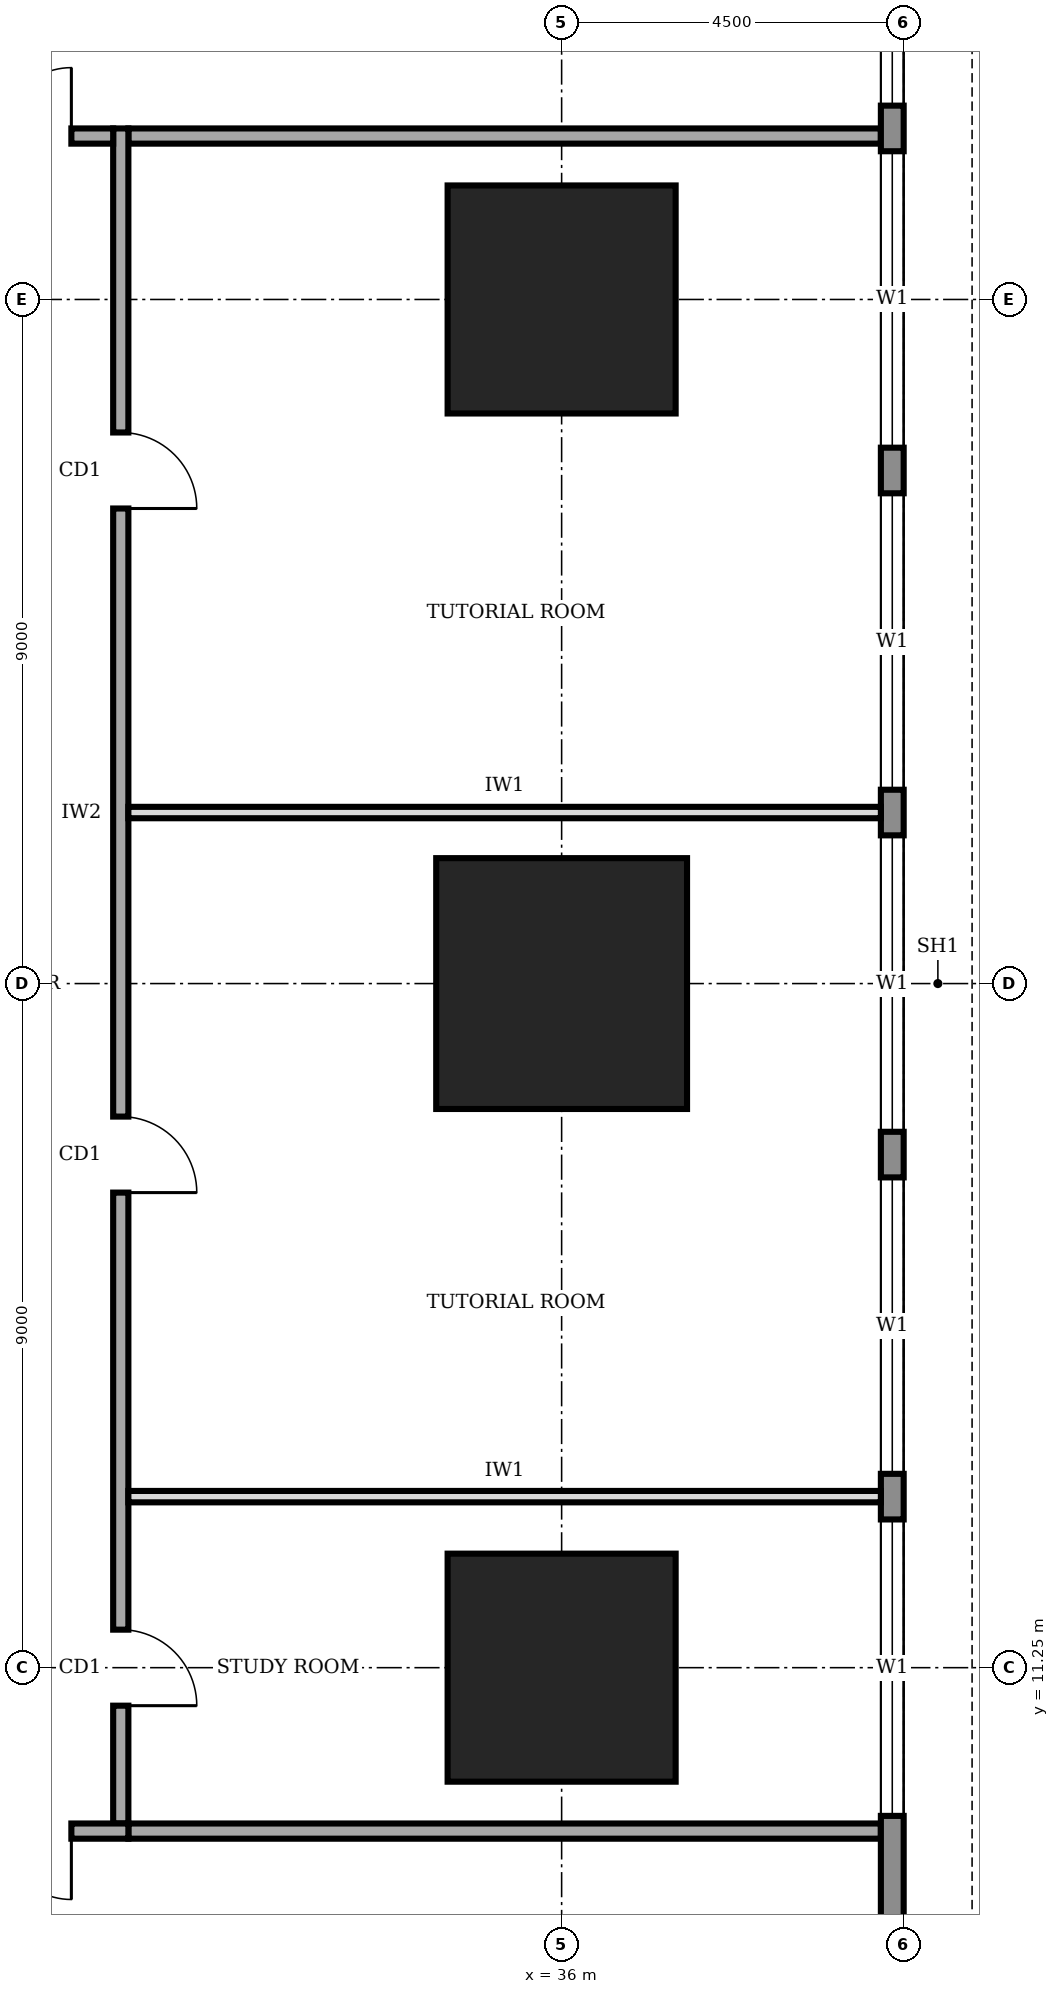
"""IFC4 building model, lengths in metres.
Left out: names, types, materials, properties, quantities, classifications, styles, units other than length and angle.
Written with IfcOpenShell. Run it as: python <this file> out.ifc"""

import sys

from ifc_helpers import new_model, si_unit, direction, frame, frame_2d, origin, origin_2d, place, context, subcontext, project, spatial, rectangle, extrude, element, fill, save


model = new_model("IFC4")
c1 = context("Model", 3, precision=1e-05, world=origin(), true_north=direction((0.0, 1.0)))
c2 = subcontext(c1, "Body", "Model", "MODEL_VIEW")
j1 = project(units=[si_unit("LENGTHUNIT", "METRE"), si_unit("PLANEANGLEUNIT", "RADIAN")], contexts=[c1])
p1 = place(None, origin())
s1 = spatial("IfcSite", under=j1, at=p1, CompositionType="ELEMENT")
p2 = place(p1, origin())
s2 = spatial("IfcBuilding", under=s1, at=p2, CompositionType="ELEMENT")
p3 = place(p2, frame((0.0, 0.0, 37.0)))
s3 = spatial("IfcBuildingStorey", under=s2, at=p3, CompositionType="ELEMENT", Elevation=37.0)
p4 = place(p3, frame((36.0, 11.25, 0.0), z_axis=(0.0, 0.0, 1.0), x_axis=(1.0, 0.0, 0.0)))
e1 = element("IfcColumn", 1, at=p4, inside=s3, PredefinedType="COLUMN", context=c2, shape_type="SweptSolid", body=[
    extrude(rectangle(XDim=3.0, YDim=3.0, at=origin_2d()), origin(), (0.0, 0.0, 1.0), 4.0),
])
p5 = place(p3, frame((36.0, 20.25, 0.0), z_axis=(0.0, 0.0, 1.0), x_axis=(1.0, 0.0, 0.0)))
e2 = element("IfcColumn", 2, at=p5, inside=s3, PredefinedType="COLUMN", context=c2, shape_type="SweptSolid", body=[
    extrude(rectangle(XDim=3.3, YDim=3.3, at=origin_2d()), origin(), (0.0, 0.0, 1.0), 4.0),
])
p6 = place(p3, frame((36.0, 29.25, 0.0), z_axis=(0.0, 0.0, 1.0), x_axis=(1.0, 0.0, 0.0)))
e3 = element("IfcColumn", 3, at=p6, inside=s3, PredefinedType="COLUMN", context=c2, shape_type="SweptSolid", body=[
    extrude(rectangle(XDim=3.0, YDim=3.0, at=origin_2d()), origin(), (0.0, 0.0, 1.0), 4.0),
])
p7 = place(p3, frame((40.35, 4.52, 0.0), z_axis=(0.0, 0.0, 1.0), x_axis=(0.0, 1.0, 0.0)))
e4 = element("IfcWall", 4, at=p7, inside=s3, PredefinedType="STANDARD", context=c2, shape_type="SweptSolid", body=[
    extrude(rectangle(XDim=31.46, YDim=0.3, at=frame_2d((15.73, 0.0))), origin(), (0.0, 0.0, 1.0), 3.75),
])
p8 = place(p7, frame((4.78, 0.0, 0.9)))
e5 = element("IfcOpeningElement", 5, at=p8, cuts=e4, PredefinedType="OPENING", context=c2, shape_type="SweptSolid", body=[
    extrude(rectangle(XDim=3.9, YDim=2.2, at=frame_2d((1.95, 1.1))), frame((0.0, 0.16, 0.0), z_axis=(0.0, -1.0, 0.0), x_axis=(1.0, 0.0, 0.0)), (0.0, 0.0, 1.0), 0.32),
])
p9 = place(p7, frame((9.28, 0.0, 0.9)))
e6 = element("IfcOpeningElement", 6, at=p9, cuts=e4, PredefinedType="OPENING", context=c2, shape_type="SweptSolid", body=[
    extrude(rectangle(XDim=3.9, YDim=2.2, at=frame_2d((1.95, 1.1))), frame((0.0, 0.16, 0.0), z_axis=(0.0, -1.0, 0.0), x_axis=(1.0, 0.0, 0.0)), (0.0, 0.0, 1.0), 0.32),
])
p10 = place(p7, frame((13.78, 0.0, 0.9)))
e7 = element("IfcOpeningElement", 7, at=p10, cuts=e4, PredefinedType="OPENING", context=c2, shape_type="SweptSolid", body=[
    extrude(rectangle(XDim=3.9, YDim=2.2, at=frame_2d((1.95, 1.1))), frame((0.0, 0.16, 0.0), z_axis=(0.0, -1.0, 0.0), x_axis=(1.0, 0.0, 0.0)), (0.0, 0.0, 1.0), 0.32),
])
p11 = place(p7, frame((18.28, 0.0, 0.9)))
e8 = element("IfcOpeningElement", 8, at=p11, cuts=e4, PredefinedType="OPENING", context=c2, shape_type="SweptSolid", body=[
    extrude(rectangle(XDim=3.9, YDim=2.2, at=frame_2d((1.95, 1.1))), frame((0.0, 0.16, 0.0), z_axis=(0.0, -1.0, 0.0), x_axis=(1.0, 0.0, 0.0)), (0.0, 0.0, 1.0), 0.32),
])
p12 = place(p7, frame((22.78, 0.0, 0.9)))
e9 = element("IfcOpeningElement", 9, at=p12, cuts=e4, PredefinedType="OPENING", context=c2, shape_type="SweptSolid", body=[
    extrude(rectangle(XDim=3.9, YDim=2.2, at=frame_2d((1.95, 1.1))), frame((0.0, 0.16, 0.0), z_axis=(0.0, -1.0, 0.0), x_axis=(1.0, 0.0, 0.0)), (0.0, 0.0, 1.0), 0.32),
])
p13 = place(p7, frame((27.28, 0.0, 0.9)))
e10 = element("IfcOpeningElement", 10, at=p13, cuts=e4, PredefinedType="OPENING", context=c2, shape_type="SweptSolid", body=[
    extrude(rectangle(XDim=3.9, YDim=2.2, at=frame_2d((1.95, 1.1))), frame((0.0, 0.16, 0.0), z_axis=(0.0, -1.0, 0.0), x_axis=(1.0, 0.0, 0.0)), (0.0, 0.0, 1.0), 0.32),
])
p14 = place(p3, frame((11.9, 9.1, 0.0), z_axis=(0.0, 0.0, 1.0), x_axis=(1.0, 0.0, 0.0)))
e11 = element("IfcWall", 11, at=p14, inside=s3, PredefinedType="SOLIDWALL", context=c2, shape_type="SweptSolid", body=[
    extrude(rectangle(XDim=18.4, YDim=0.2, at=frame_2d((9.2, 0.0))), origin(), (0.0, 0.0, 1.0), 3.75),
])
p15 = place(p14, frame((0.275, 0.0, 0.0)))
e12 = element("IfcOpeningElement", 12, at=p15, cuts=e11, PredefinedType="OPENING", context=c2, shape_type="SweptSolid", body=[
    extrude(rectangle(XDim=1.0, YDim=2.1, at=frame_2d((0.5, 1.05))), frame((0.0, 0.11, 0.0), z_axis=(0.0, -1.0, 0.0), x_axis=(1.0, 0.0, 0.0)), (0.0, 0.0, 1.0), 0.22),
])
p16 = place(p14, frame((3.35, 0.0, 0.0)))
e13 = element("IfcOpeningElement", 13, at=p16, cuts=e11, PredefinedType="OPENING", context=c2, shape_type="SweptSolid", body=[
    extrude(rectangle(XDim=1.0, YDim=2.1, at=frame_2d((0.5, 1.05))), frame((0.0, 0.11, 0.0), z_axis=(0.0, -1.0, 0.0), x_axis=(1.0, 0.0, 0.0)), (0.0, 0.0, 1.0), 0.22),
])
p17 = place(p14, frame((10.1, 0.0, 0.0)))
e14 = element("IfcOpeningElement", 14, at=p17, cuts=e11, PredefinedType="OPENING", context=c2, shape_type="SweptSolid", body=[
    extrude(rectangle(XDim=1.0, YDim=2.1, at=frame_2d((0.5, 1.05))), frame((0.0, 0.11, 0.0), z_axis=(0.0, -1.0, 0.0), x_axis=(1.0, 0.0, 0.0)), (0.0, 0.0, 1.0), 0.22),
])
p18 = place(p14, frame((15.85, 0.0, 0.0)))
e15 = element("IfcOpeningElement", 15, at=p18, cuts=e11, PredefinedType="OPENING", context=c2, shape_type="SweptSolid", body=[
    extrude(rectangle(XDim=1.8, YDim=2.1, at=frame_2d((0.9, 1.05))), frame((0.0, 0.11, 0.0), z_axis=(0.0, -1.0, 0.0), x_axis=(1.0, 0.0, 0.0)), (0.0, 0.0, 1.0), 0.22),
])
p19 = place(p3, frame((30.2, 9.2, 0.0), z_axis=(0.0, 0.0, 1.0), x_axis=(0.0, 1.0, 0.0)))
e16 = element("IfcWall", 16, at=p19, inside=s3, PredefinedType="SOLIDWALL", context=c2, shape_type="SweptSolid", body=[
    extrude(rectangle(XDim=22.3, YDim=0.2, at=frame_2d((11.15, 0.0))), origin(), (0.0, 0.0, 1.0), 3.75),
])
p20 = place(p19, frame((1.55, 0.0, 0.0)))
e17 = element("IfcOpeningElement", 17, at=p20, cuts=e16, PredefinedType="OPENING", context=c2, shape_type="SweptSolid", body=[
    extrude(rectangle(XDim=1.0, YDim=2.1, at=frame_2d((0.5, 1.05))), frame((0.0, 0.11, 0.0), z_axis=(0.0, -1.0, 0.0), x_axis=(1.0, 0.0, 0.0)), (0.0, 0.0, 1.0), 0.22),
])
p21 = place(p19, frame((8.3, 0.0, 0.0)))
e18 = element("IfcOpeningElement", 18, at=p21, cuts=e16, PredefinedType="OPENING", context=c2, shape_type="SweptSolid", body=[
    extrude(rectangle(XDim=1.0, YDim=2.1, at=frame_2d((0.5, 1.05))), frame((0.0, 0.11, 0.0), z_axis=(0.0, -1.0, 0.0), x_axis=(1.0, 0.0, 0.0)), (0.0, 0.0, 1.0), 0.22),
])
p22 = place(p19, frame((17.3, 0.0, 0.0)))
e19 = element("IfcOpeningElement", 19, at=p22, cuts=e16, PredefinedType="OPENING", context=c2, shape_type="SweptSolid", body=[
    extrude(rectangle(XDim=1.0, YDim=2.1, at=frame_2d((0.5, 1.05))), frame((0.0, 0.11, 0.0), z_axis=(0.0, -1.0, 0.0), x_axis=(1.0, 0.0, 0.0)), (0.0, 0.0, 1.0), 0.22),
])
p23 = place(p3, frame((30.1, 31.4, 0.0), z_axis=(0.0, 0.0, 1.0), x_axis=(-1.0, 0.0, 0.0)))
e20 = element("IfcWall", 20, at=p23, inside=s3, PredefinedType="SOLIDWALL", context=c2, shape_type="SweptSolid", body=[
    extrude(rectangle(XDim=18.4, YDim=0.2, at=frame_2d((9.2, 0.0))), origin(), (0.0, 0.0, 1.0), 3.75),
])
p24 = place(p23, frame((16.925, 0.0, 0.0)))
e21 = element("IfcOpeningElement", 21, at=p24, cuts=e20, PredefinedType="OPENING", context=c2, shape_type="SweptSolid", body=[
    extrude(rectangle(XDim=1.0, YDim=2.1, at=frame_2d((0.5, 1.05))), frame((0.0, 0.11, 0.0), z_axis=(0.0, -1.0, 0.0), x_axis=(1.0, 0.0, 0.0)), (0.0, 0.0, 1.0), 0.22),
])
p25 = place(p23, frame((13.85, 0.0, 0.0)))
e22 = element("IfcOpeningElement", 22, at=p25, cuts=e20, PredefinedType="OPENING", context=c2, shape_type="SweptSolid", body=[
    extrude(rectangle(XDim=1.0, YDim=2.1, at=frame_2d((0.5, 1.05))), frame((0.0, 0.11, 0.0), z_axis=(0.0, -1.0, 0.0), x_axis=(1.0, 0.0, 0.0)), (0.0, 0.0, 1.0), 0.22),
])
p26 = place(p23, frame((7.1, 0.0, 0.0)))
e23 = element("IfcOpeningElement", 23, at=p26, cuts=e20, PredefinedType="OPENING", context=c2, shape_type="SweptSolid", body=[
    extrude(rectangle(XDim=1.0, YDim=2.1, at=frame_2d((0.5, 1.05))), frame((0.0, 0.11, 0.0), z_axis=(0.0, -1.0, 0.0), x_axis=(1.0, 0.0, 0.0)), (0.0, 0.0, 1.0), 0.22),
])
p27 = place(p23, frame((0.55, 0.0, 0.0)))
e24 = element("IfcOpeningElement", 24, at=p27, cuts=e20, PredefinedType="OPENING", context=c2, shape_type="SweptSolid", body=[
    extrude(rectangle(XDim=1.8, YDim=2.1, at=frame_2d((0.9, 1.05))), frame((0.0, 0.11, 0.0), z_axis=(0.0, -1.0, 0.0), x_axis=(1.0, 0.0, 0.0)), (0.0, 0.0, 1.0), 0.22),
])
for number, where, z_axis, x_axis in (
    (25, (30.3, 9.1, 0.0), (0.0, 0.0, 1.0), (1.0, 0.0, 0.0)),
    (26, (30.3, 31.4, 0.0), (0.0, 0.0, 1.0), (1.0, 0.0, 0.0)),
):
    element("IfcWall", number, at=place(p3, frame(where, z_axis=z_axis, x_axis=x_axis)), inside=s3, PredefinedType="SOLIDWALL", context=c2, shape_type="SweptSolid", body=[
        extrude(rectangle(XDim=9.9, YDim=0.2, at=frame_2d((4.95, 0.0))), origin(), (0.0, 0.0, 1.0), 3.75),
    ])
for number, where, z_axis, x_axis in (
    (27, (30.3, 13.5, 0.0), (0.0, 0.0, 1.0), (1.0, 0.0, 0.0)),
    (28, (30.3, 22.5, 0.0), (0.0, 0.0, 1.0), (1.0, 0.0, 0.0)),
):
    element("IfcWall", number, at=place(p3, frame(where, z_axis=z_axis, x_axis=x_axis)), inside=s3, PredefinedType="PARTITIONING", context=c2, shape_type="SweptSolid", body=[
        extrude(rectangle(XDim=9.9, YDim=0.15, at=frame_2d((4.95, 0.0))), origin(), (0.0, 0.0, 1.0), 3.75),
    ])
p28 = place(p8, origin())
e29 = element("IfcWindow", 29, at=p28, inside=s3, PartitioningType="SINGLE_PANEL", PredefinedType="WINDOW", context=c2, shape_type="SweptSolid", body=[
    extrude(rectangle(XDim=3.9, YDim=2.2, at=frame_2d((1.95, 1.1))), frame((0.0, 0.03, 0.0), z_axis=(0.0, -1.0, 0.0), x_axis=(1.0, 0.0, 0.0)), (0.0, 0.0, 1.0), 0.06),
])
fill(e5, e29)
p29 = place(p9, origin())
e30 = element("IfcWindow", 30, at=p29, inside=s3, PartitioningType="SINGLE_PANEL", PredefinedType="WINDOW", context=c2, shape_type="SweptSolid", body=[
    extrude(rectangle(XDim=3.9, YDim=2.2, at=frame_2d((1.95, 1.1))), frame((0.0, 0.03, 0.0), z_axis=(0.0, -1.0, 0.0), x_axis=(1.0, 0.0, 0.0)), (0.0, 0.0, 1.0), 0.06),
])
fill(e6, e30)
p30 = place(p10, origin())
e31 = element("IfcWindow", 31, at=p30, inside=s3, PartitioningType="SINGLE_PANEL", PredefinedType="WINDOW", context=c2, shape_type="SweptSolid", body=[
    extrude(rectangle(XDim=3.9, YDim=2.2, at=frame_2d((1.95, 1.1))), frame((0.0, 0.03, 0.0), z_axis=(0.0, -1.0, 0.0), x_axis=(1.0, 0.0, 0.0)), (0.0, 0.0, 1.0), 0.06),
])
fill(e7, e31)
p31 = place(p11, origin())
e32 = element("IfcWindow", 32, at=p31, inside=s3, PartitioningType="SINGLE_PANEL", PredefinedType="WINDOW", context=c2, shape_type="SweptSolid", body=[
    extrude(rectangle(XDim=3.9, YDim=2.2, at=frame_2d((1.95, 1.1))), frame((0.0, 0.03, 0.0), z_axis=(0.0, -1.0, 0.0), x_axis=(1.0, 0.0, 0.0)), (0.0, 0.0, 1.0), 0.06),
])
fill(e8, e32)
p32 = place(p12, origin())
e33 = element("IfcWindow", 33, at=p32, inside=s3, PartitioningType="SINGLE_PANEL", PredefinedType="WINDOW", context=c2, shape_type="SweptSolid", body=[
    extrude(rectangle(XDim=3.9, YDim=2.2, at=frame_2d((1.95, 1.1))), frame((0.0, 0.03, 0.0), z_axis=(0.0, -1.0, 0.0), x_axis=(1.0, 0.0, 0.0)), (0.0, 0.0, 1.0), 0.06),
])
fill(e9, e33)
p33 = place(p13, origin())
e34 = element("IfcWindow", 34, at=p33, inside=s3, PartitioningType="SINGLE_PANEL", PredefinedType="WINDOW", context=c2, shape_type="SweptSolid", body=[
    extrude(rectangle(XDim=3.9, YDim=2.2, at=frame_2d((1.95, 1.1))), frame((0.0, 0.03, 0.0), z_axis=(0.0, -1.0, 0.0), x_axis=(1.0, 0.0, 0.0)), (0.0, 0.0, 1.0), 0.06),
])
fill(e10, e34)
p34 = place(p18, frame((1.8, 0.0, 0.0), z_axis=(0.0, 0.0, 1.0), x_axis=(-1.0, 0.0, 0.0)))
e35 = element("IfcDoor", 35, at=p34, inside=s3, OperationType="DOUBLE_DOOR_SINGLE_SWING", PredefinedType="DOOR", context=c2, shape_type="SweptSolid", body=[
    extrude(rectangle(XDim=1.8, YDim=2.1, at=frame_2d((0.9, 1.05))), frame((0.0, 0.025, 0.0), z_axis=(0.0, -1.0, 0.0), x_axis=(1.0, 0.0, 0.0)), (0.0, 0.0, 1.0), 0.05),
])
fill(e15, e35)
p35 = place(p20, frame((1.0, 0.0, 0.0), z_axis=(0.0, 0.0, 1.0), x_axis=(-1.0, 0.0, 0.0)))
e36 = element("IfcDoor", 36, at=p35, inside=s3, OperationType="SINGLE_SWING_RIGHT", PredefinedType="DOOR", context=c2, shape_type="SweptSolid", body=[
    extrude(rectangle(XDim=1.0, YDim=2.1, at=frame_2d((0.5, 1.05))), frame((0.0, 0.025, 0.0), z_axis=(0.0, -1.0, 0.0), x_axis=(1.0, 0.0, 0.0)), (0.0, 0.0, 1.0), 0.05),
])
fill(e17, e36)
p36 = place(p21, frame((1.0, 0.0, 0.0), z_axis=(0.0, 0.0, 1.0), x_axis=(-1.0, 0.0, 0.0)))
e37 = element("IfcDoor", 37, at=p36, inside=s3, OperationType="SINGLE_SWING_RIGHT", PredefinedType="DOOR", context=c2, shape_type="SweptSolid", body=[
    extrude(rectangle(XDim=1.0, YDim=2.1, at=frame_2d((0.5, 1.05))), frame((0.0, 0.025, 0.0), z_axis=(0.0, -1.0, 0.0), x_axis=(1.0, 0.0, 0.0)), (0.0, 0.0, 1.0), 0.05),
])
fill(e18, e37)
p37 = place(p22, frame((1.0, 0.0, 0.0), z_axis=(0.0, 0.0, 1.0), x_axis=(-1.0, 0.0, 0.0)))
e38 = element("IfcDoor", 38, at=p37, inside=s3, OperationType="SINGLE_SWING_RIGHT", PredefinedType="DOOR", context=c2, shape_type="SweptSolid", body=[
    extrude(rectangle(XDim=1.0, YDim=2.1, at=frame_2d((0.5, 1.05))), frame((0.0, 0.025, 0.0), z_axis=(0.0, -1.0, 0.0), x_axis=(1.0, 0.0, 0.0)), (0.0, 0.0, 1.0), 0.05),
])
fill(e19, e38)
p38 = place(p27, frame((1.8, 0.0, 0.0), z_axis=(0.0, 0.0, 1.0), x_axis=(-1.0, 0.0, 0.0)))
e39 = element("IfcDoor", 39, at=p38, inside=s3, OperationType="DOUBLE_DOOR_SINGLE_SWING", PredefinedType="DOOR", context=c2, shape_type="SweptSolid", body=[
    extrude(rectangle(XDim=1.8, YDim=2.1, at=frame_2d((0.9, 1.05))), frame((0.0, 0.025, 0.0), z_axis=(0.0, -1.0, 0.0), x_axis=(1.0, 0.0, 0.0)), (0.0, 0.0, 1.0), 0.05),
])
fill(e24, e39)
save(model, sys.argv[1])
